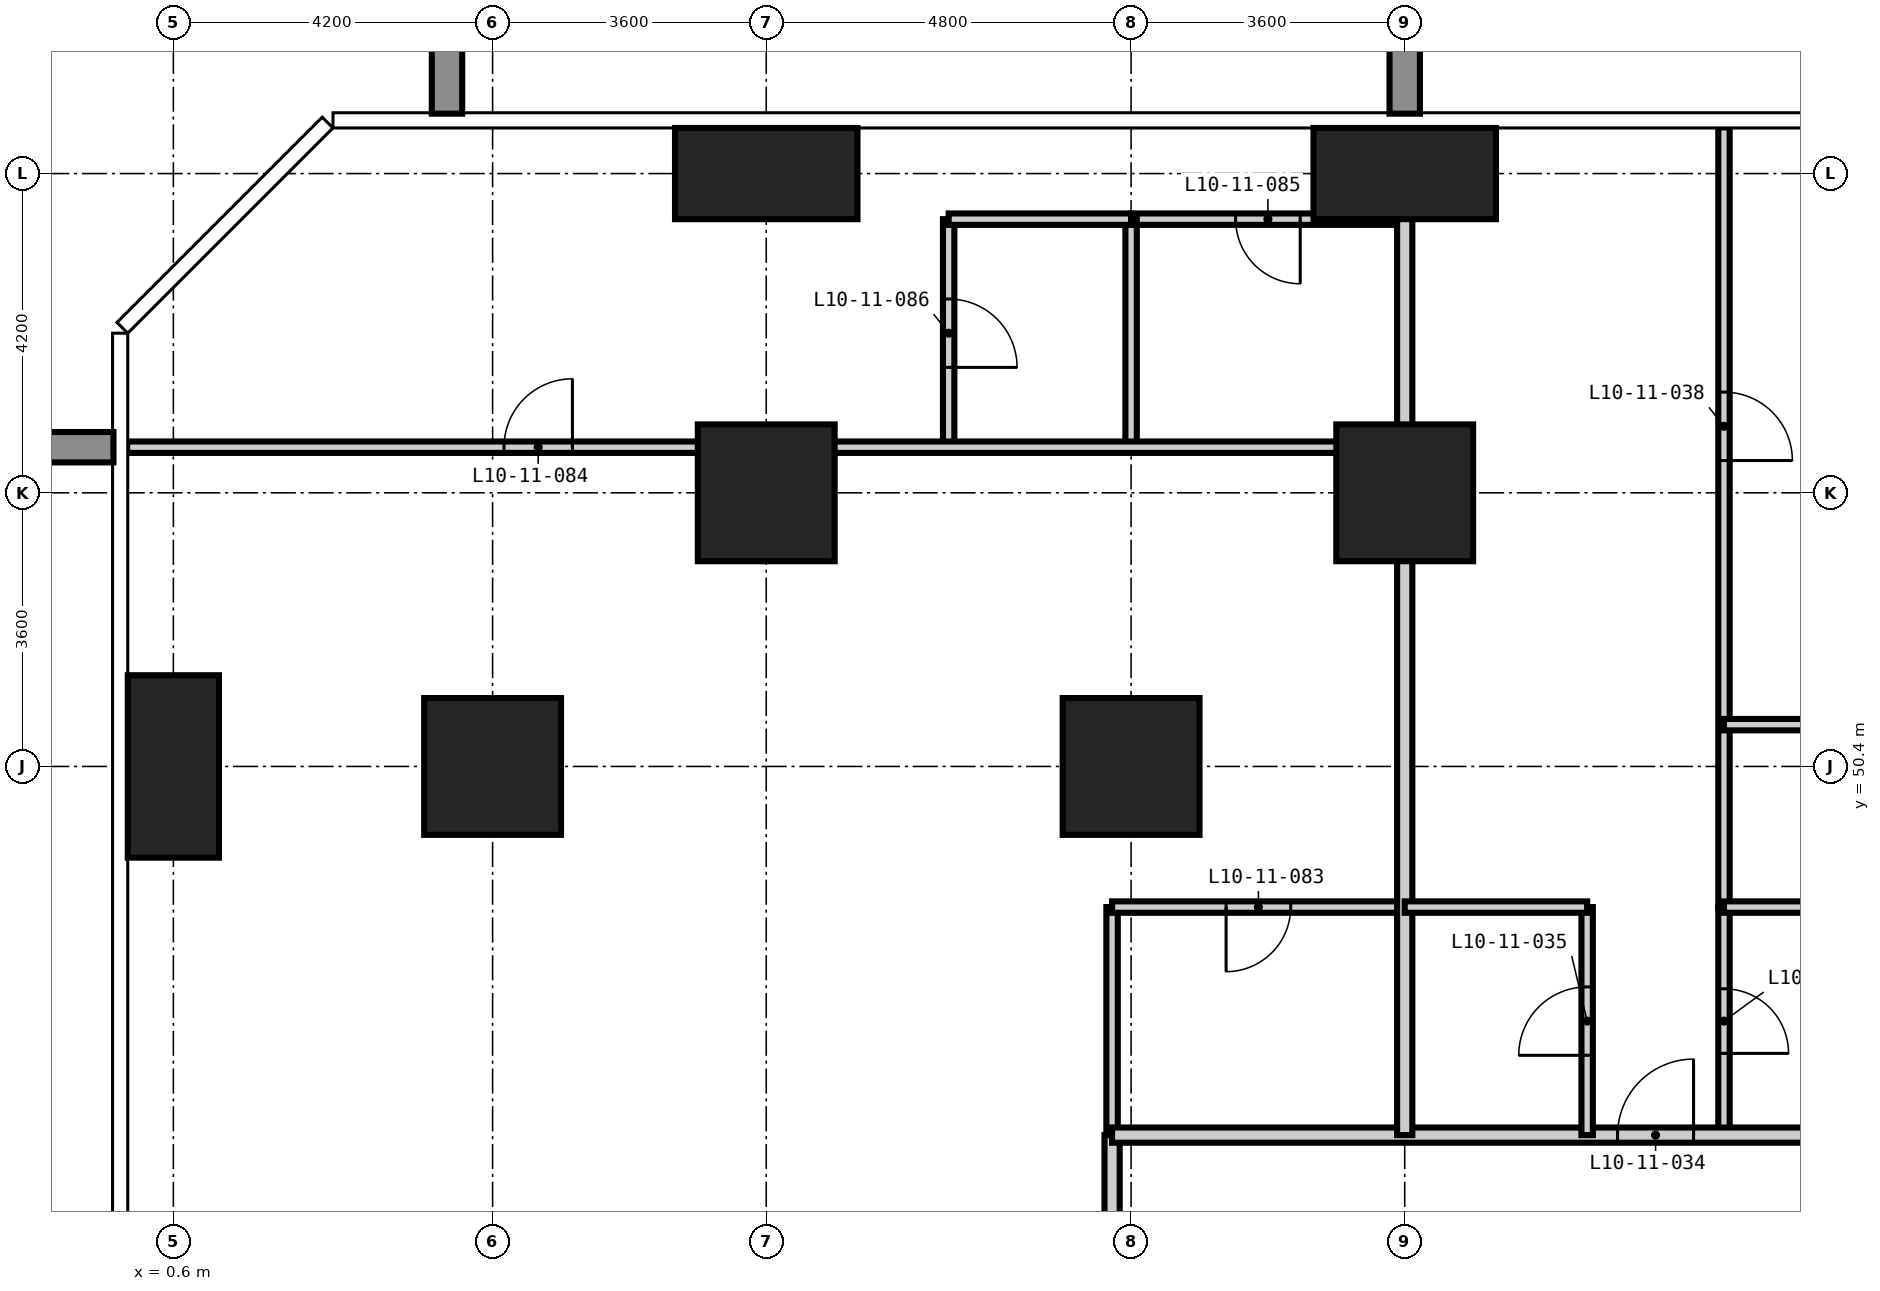
"""IFC4 building model, lengths in metres.
Left out: names, types, materials, properties, quantities, classifications, styles, units other than length and angle.
Written with IfcOpenShell. Run it as: python <this file> out.ifc"""

import sys

from ifc_helpers import new_model, si_unit, direction, frame, frame_2d, origin, origin_2d, place, context, subcontext, project, spatial, rectangle, extrude, element, fill, save


model = new_model("IFC4")
c1 = context("Model", 3, precision=1e-05, world=origin(), true_north=direction((0.0, 1.0)))
c2 = subcontext(c1, "Body", "Model", "MODEL_VIEW")
j1 = project(units=[si_unit("LENGTHUNIT", "METRE"), si_unit("PLANEANGLEUNIT", "RADIAN")], contexts=[c1])
p1 = place(None, origin())
s1 = spatial("IfcSite", under=j1, at=p1, CompositionType="ELEMENT")
p2 = place(p1, origin())
s2 = spatial("IfcBuilding", under=s1, at=p2, CompositionType="ELEMENT")
p3 = place(p2, frame((0.0, 0.0, 45.0)))
s3 = spatial("IfcBuildingStorey", under=s2, at=p3, CompositionType="ELEMENT", Elevation=45.0)
p4 = place(p3, frame((0.6, 50.4, -0.35), z_axis=(0.0, 0.0, 1.0), x_axis=(1.0, 0.0, 0.0)))
e1 = element("IfcColumn", 1, at=p4, inside=s3, PredefinedType="COLUMN", context=c2, shape_type="SweptSolid", body=[
    extrude(rectangle(XDim=1.2, YDim=2.4, at=origin_2d()), origin(), (0.0, 0.0, 1.0), 3.6),
])
for number, where, z_axis, x_axis in (
    (2, (4.8, 50.4, -0.35), (0.0, 0.0, 1.0), (1.0, 0.0, 0.0)),
    (3, (8.4, 54.0, -0.35), (0.0, 0.0, 1.0), (1.0, 0.0, 0.0)),
):
    element("IfcColumn", number, at=place(p3, frame(where, z_axis=z_axis, x_axis=x_axis)), inside=s3, PredefinedType="COLUMN", context=c2, shape_type="SweptSolid", body=[
        extrude(rectangle(XDim=1.8, YDim=1.8, at=origin_2d()), origin(), (0.0, 0.0, 1.0), 3.6),
    ])
p5 = place(p3, frame((8.4, 58.2, -0.35), z_axis=(0.0, 0.0, 1.0), x_axis=(1.0, 0.0, 0.0)))
e4 = element("IfcColumn", 4, at=p5, inside=s3, PredefinedType="COLUMN", context=c2, shape_type="SweptSolid", body=[
    extrude(rectangle(XDim=2.4, YDim=1.2, at=origin_2d()), origin(), (0.0, 0.0, 1.0), 3.6),
])
for number, where, z_axis, x_axis in (
    (5, (13.2, 50.4, -0.35), (0.0, 0.0, 1.0), (1.0, 0.0, 0.0)),
    (6, (16.8, 54.0, -0.35), (0.0, 0.0, 1.0), (1.0, 0.0, 0.0)),
):
    element("IfcColumn", number, at=place(p3, frame(where, z_axis=z_axis, x_axis=x_axis)), inside=s3, PredefinedType="COLUMN", context=c2, shape_type="SweptSolid", body=[
        extrude(rectangle(XDim=1.8, YDim=1.8, at=origin_2d()), origin(), (0.0, 0.0, 1.0), 3.6),
    ])
p6 = place(p3, frame((16.8, 58.2, -0.35), z_axis=(0.0, 0.0, 1.0), x_axis=(1.0, 0.0, 0.0)))
e7 = element("IfcColumn", 7, at=p6, inside=s3, PredefinedType="COLUMN", context=c2, shape_type="SweptSolid", body=[
    extrude(rectangle(XDim=2.4, YDim=1.2, at=origin_2d()), origin(), (0.0, 0.0, 1.0), 3.6),
])
p7 = place(p3, frame((12.95, 45.55, 0.0), z_axis=(0.0, 0.0, 1.0), x_axis=(0.0, 1.0, 0.0)))
e8 = element("IfcWall", 8, at=p7, inside=s3, PredefinedType="PARTITIONING", context=c2, shape_type="SweptSolid", body=[
    extrude(rectangle(XDim=3.0, YDim=0.15, at=frame_2d((1.5, 0.0))), origin(), (0.0, 0.0, 1.0), 3.25),
])
p8 = place(p3, frame((21.0, 45.55, 0.0), z_axis=(0.0, 0.0, 1.0), x_axis=(0.0, 1.0, 0.0)))
e9 = element("IfcWall", 9, at=p8, inside=s3, PredefinedType="PARTITIONING", context=c2, shape_type="SweptSolid", body=[
    extrude(rectangle(XDim=3.0, YDim=0.15, at=frame_2d((1.5, 0.0))), origin(), (0.0, 0.0, 1.0), 3.25),
])
p9 = place(p8, frame((1.075, 0.0, 0.0)))
e10 = element("IfcOpeningElement", 10, at=p9, cuts=e9, PredefinedType="OPENING", context=c2, shape_type="SweptSolid", body=[
    extrude(rectangle(XDim=0.85, YDim=2.1, at=frame_2d((0.425, 1.05))), frame((0.0, 0.085, 0.0), z_axis=(0.0, -1.0, 0.0), x_axis=(1.0, 0.0, 0.0)), (0.0, 0.0, 1.0), 0.17),
])
p10 = place(p3, frame((12.95, 48.55, 0.0), z_axis=(0.0, 0.0, 1.0), x_axis=(1.0, 0.0, 0.0)))
e11 = element("IfcWall", 11, at=p10, inside=s3, PredefinedType="PARTITIONING", context=c2, shape_type="SweptSolid", body=[
    extrude(rectangle(XDim=3.85, YDim=0.15, at=frame_2d((1.925, 0.0))), origin(), (0.0, 0.0, 1.0), 3.25),
])
p11 = place(p10, frame((1.5, 0.0, 0.0)))
e12 = element("IfcOpeningElement", 12, at=p11, cuts=e11, PredefinedType="OPENING", context=c2, shape_type="SweptSolid", body=[
    extrude(rectangle(XDim=0.85, YDim=2.1, at=frame_2d((0.425, 1.05))), frame((0.0, 0.085, 0.0), z_axis=(0.0, -1.0, 0.0), x_axis=(1.0, 0.0, 0.0)), (0.0, 0.0, 1.0), 0.17),
])
p12 = place(p3, frame((13.2, 57.6, 0.0), z_axis=(0.0, 0.0, 1.0), x_axis=(1.0, 0.0, 0.0)))
e13 = element("IfcWall", 13, at=p12, inside=s3, PredefinedType="PARTITIONING", context=c2, shape_type="SweptSolid", body=[
    extrude(rectangle(XDim=3.6, YDim=0.15, at=frame_2d((1.8, 0.0))), origin(), (0.0, 0.0, 1.0), 3.25),
])
p13 = place(p12, frame((1.375, 0.0, 0.0)))
e14 = element("IfcOpeningElement", 14, at=p13, cuts=e13, PredefinedType="OPENING", context=c2, shape_type="SweptSolid", body=[
    extrude(rectangle(XDim=0.85, YDim=2.1, at=frame_2d((0.425, 1.05))), frame((0.0, 0.085, 0.0), z_axis=(0.0, -1.0, 0.0), x_axis=(1.0, 0.0, 0.0)), (0.0, 0.0, 1.0), 0.17),
])
p14 = place(p3, frame((12.95, 12.95, 0.0), z_axis=(0.0, 0.0, 1.0), x_axis=(0.0, 1.0, 0.0)))
e15 = element("IfcWall", 15, at=p14, inside=s3, PredefinedType="PARTITIONING", context=c2, shape_type="SweptSolid", body=[
    extrude(rectangle(XDim=32.6, YDim=0.2, at=frame_2d((16.3, 0.0))), origin(), (0.0, 0.0, 1.0), 3.25),
])
p15 = place(p14, frame((8.45, 0.0, 0.0)))
e16 = element("IfcOpeningElement", 16, at=p15, cuts=e15, PredefinedType="OPENING", context=c2, shape_type="SweptSolid", body=[
    extrude(rectangle(XDim=1.0, YDim=2.2, at=frame_2d((0.5, 1.1))), frame((0.0, 0.11, 0.0), z_axis=(0.0, -1.0, 0.0), x_axis=(1.0, 0.0, 0.0)), (0.0, 0.0, 1.0), 0.22),
])
p16 = place(p14, frame((16.7, 0.0, 0.0)))
e17 = element("IfcOpeningElement", 17, at=p16, cuts=e15, PredefinedType="OPENING", context=c2, shape_type="SweptSolid", body=[
    extrude(rectangle(XDim=1.0, YDim=2.2, at=frame_2d((0.5, 1.1))), frame((0.0, 0.11, 0.0), z_axis=(0.0, -1.0, 0.0), x_axis=(1.0, 0.0, 0.0)), (0.0, 0.0, 1.0), 0.22),
])
p17 = place(p14, frame((23.6, 0.0, 0.0)))
e18 = element("IfcOpeningElement", 18, at=p17, cuts=e15, PredefinedType="OPENING", context=c2, shape_type="SweptSolid", body=[
    extrude(rectangle(XDim=1.0, YDim=2.2, at=frame_2d((0.5, 1.1))), frame((0.0, 0.11, 0.0), z_axis=(0.0, -1.0, 0.0), x_axis=(1.0, 0.0, 0.0)), (0.0, 0.0, 1.0), 0.22),
])
p18 = place(p14, frame((25.1, 0.0, 0.0)))
e19 = element("IfcOpeningElement", 19, at=p18, cuts=e15, PredefinedType="OPENING", context=c2, shape_type="SweptSolid", body=[
    extrude(rectangle(XDim=1.0, YDim=2.2, at=frame_2d((0.5, 1.1))), frame((0.0, 0.11, 0.0), z_axis=(0.0, -1.0, 0.0), x_axis=(1.0, 0.0, 0.0)), (0.0, 0.0, 1.0), 0.22),
])
p19 = place(p14, frame((1.425, 0.0, 0.0)))
e20 = element("IfcOpeningElement", 20, at=p19, cuts=e15, PredefinedType="OPENING", context=c2, shape_type="SweptSolid", body=[
    extrude(rectangle(XDim=1.0, YDim=2.2, at=frame_2d((0.5, 1.1))), frame((0.0, 0.11, 0.0), z_axis=(0.0, -1.0, 0.0), x_axis=(1.0, 0.0, 0.0)), (0.0, 0.0, 1.0), 0.22),
])
p20 = place(p14, frame((30.325, 0.0, 0.0)))
e21 = element("IfcOpeningElement", 21, at=p20, cuts=e15, PredefinedType="OPENING", context=c2, shape_type="SweptSolid", body=[
    extrude(rectangle(XDim=1.0, YDim=2.2, at=frame_2d((0.5, 1.1))), frame((0.0, 0.11, 0.0), z_axis=(0.0, -1.0, 0.0), x_axis=(1.0, 0.0, 0.0)), (0.0, 0.0, 1.0), 0.22),
])
p21 = place(p3, frame((12.95, 45.55, 0.0), z_axis=(0.0, 0.0, 1.0), x_axis=(1.0, 0.0, 0.0)))
e22 = element("IfcWall", 22, at=p21, inside=s3, PredefinedType="PARTITIONING", context=c2, shape_type="SweptSolid", body=[
    extrude(rectangle(XDim=32.3, YDim=0.2, at=frame_2d((16.15, 0.0))), origin(), (0.0, 0.0, 1.0), 3.25),
])
p22 = place(p21, frame((6.65, 0.0, 0.0)))
e23 = element("IfcOpeningElement", 23, at=p22, cuts=e22, PredefinedType="OPENING", context=c2, shape_type="SweptSolid", body=[
    extrude(rectangle(XDim=1.0, YDim=2.2, at=frame_2d((0.5, 1.1))), frame((0.0, 0.11, 0.0), z_axis=(0.0, -1.0, 0.0), x_axis=(1.0, 0.0, 0.0)), (0.0, 0.0, 1.0), 0.22),
])
p23 = place(p21, frame((15.05, 0.0, 0.0)))
e24 = element("IfcOpeningElement", 24, at=p23, cuts=e22, PredefinedType="OPENING", context=c2, shape_type="SweptSolid", body=[
    extrude(rectangle(XDim=1.0, YDim=2.2, at=frame_2d((0.5, 1.1))), frame((0.0, 0.11, 0.0), z_axis=(0.0, -1.0, 0.0), x_axis=(1.0, 0.0, 0.0)), (0.0, 0.0, 1.0), 0.22),
])
p24 = place(p21, frame((23.45, 0.0, 0.0)))
e25 = element("IfcOpeningElement", 25, at=p24, cuts=e22, PredefinedType="OPENING", context=c2, shape_type="SweptSolid", body=[
    extrude(rectangle(XDim=1.0, YDim=2.2, at=frame_2d((0.5, 1.1))), frame((0.0, 0.11, 0.0), z_axis=(0.0, -1.0, 0.0), x_axis=(1.0, 0.0, 0.0)), (0.0, 0.0, 1.0), 0.22),
])
p25 = place(p3, frame((16.8, 45.55, 0.0), z_axis=(0.0, 0.0, 1.0), x_axis=(0.0, 1.0, 0.0)))
e26 = element("IfcWall", 26, at=p25, inside=s3, PredefinedType="PARTITIONING", context=c2, shape_type="SweptSolid", body=[
    extrude(rectangle(XDim=13.258, YDim=0.2, at=frame_2d((6.629, 0.0))), origin(), (0.0, 0.0, 1.0), 3.25),
])
p26 = place(p3, frame((10.8, 54.6, 0.0), z_axis=(0.0, 0.0, 1.0), x_axis=(0.0, 1.0, 0.0)))
e27 = element("IfcWall", 27, at=p26, inside=s3, PredefinedType="PARTITIONING", context=c2, shape_type="SweptSolid", body=[
    extrude(rectangle(XDim=3.0, YDim=0.15, at=frame_2d((1.5, 0.0))), origin(), (0.0, 0.0, 1.0), 3.25),
])
p27 = place(p26, frame((1.05, 0.0, 0.0)))
e28 = element("IfcOpeningElement", 28, at=p27, cuts=e27, PredefinedType="OPENING", context=c2, shape_type="SweptSolid", body=[
    extrude(rectangle(XDim=0.9, YDim=2.1, at=frame_2d((0.45, 1.05))), frame((0.0, 0.085, 0.0), z_axis=(0.0, -1.0, 0.0), x_axis=(1.0, 0.0, 0.0)), (0.0, 0.0, 1.0), 0.17),
])
p28 = place(p3, frame((13.2, 54.6, 0.0), z_axis=(0.0, 0.0, 1.0), x_axis=(0.0, 1.0, 0.0)))
e29 = element("IfcWall", 29, at=p28, inside=s3, PredefinedType="PARTITIONING", context=c2, shape_type="SweptSolid", body=[
    extrude(rectangle(XDim=3.0, YDim=0.15, at=frame_2d((1.5, 0.0))), origin(), (0.0, 0.0, 1.0), 3.25),
])
p29 = place(p3, frame((19.2, 45.55, 0.0), z_axis=(0.0, 0.0, 1.0), x_axis=(0.0, 1.0, 0.0)))
e30 = element("IfcWall", 30, at=p29, inside=s3, PredefinedType="PARTITIONING", context=c2, shape_type="SweptSolid", body=[
    extrude(rectangle(XDim=3.0, YDim=0.15, at=frame_2d((1.5, 0.0))), origin(), (0.0, 0.0, 1.0), 3.25),
])
p30 = place(p29, frame((1.05, 0.0, 0.0)))
e31 = element("IfcOpeningElement", 31, at=p30, cuts=e30, PredefinedType="OPENING", context=c2, shape_type="SweptSolid", body=[
    extrude(rectangle(XDim=0.9, YDim=2.1, at=frame_2d((0.45, 1.05))), frame((0.0, 0.085, 0.0), z_axis=(0.0, -1.0, 0.0), x_axis=(1.0, 0.0, 0.0)), (0.0, 0.0, 1.0), 0.17),
])
p31 = place(p3, frame((21.0, 48.55, 0.0), z_axis=(0.0, 0.0, 1.0), x_axis=(0.0, 1.0, 0.0)))
e32 = element("IfcWall", 32, at=p31, inside=s3, PredefinedType="PARTITIONING", context=c2, shape_type="SweptSolid", body=[
    extrude(rectangle(XDim=10.258, YDim=0.15, at=frame_2d((5.129, 0.0))), origin(), (0.0, 0.0, 1.0), 3.25),
])
p32 = place(p31, frame((5.875, 0.0, 0.0)))
e33 = element("IfcOpeningElement", 33, at=p32, cuts=e32, PredefinedType="OPENING", context=c2, shape_type="SweptSolid", body=[
    extrude(rectangle(XDim=0.9, YDim=2.1, at=frame_2d((0.45, 1.05))), frame((0.0, 0.085, 0.0), z_axis=(0.0, -1.0, 0.0), x_axis=(1.0, 0.0, 0.0)), (0.0, 0.0, 1.0), 0.17),
])
p33 = place(p3, frame((16.8, 48.55, 0.0), z_axis=(0.0, 0.0, 1.0), x_axis=(1.0, 0.0, 0.0)))
e34 = element("IfcWall", 34, at=p33, inside=s3, PredefinedType="PARTITIONING", context=c2, shape_type="SweptSolid", body=[
    extrude(rectangle(XDim=2.4, YDim=0.15, at=frame_2d((1.2, 0.0))), origin(), (0.0, 0.0, 1.0), 3.25),
])
p34 = place(p3, frame((21.0, 48.55, 0.0), z_axis=(0.0, 0.0, 1.0), x_axis=(1.0, 0.0, 0.0)))
e35 = element("IfcWall", 35, at=p34, inside=s3, PredefinedType="PARTITIONING", context=c2, shape_type="SweptSolid", body=[
    extrude(rectangle(XDim=6.6, YDim=0.15, at=frame_2d((3.3, 0.0))), origin(), (0.0, 0.0, 1.0), 3.25),
])
p35 = place(p3, frame((21.0, 50.95, 0.0), z_axis=(0.0, 0.0, 1.0), x_axis=(1.0, 0.0, 0.0)))
e36 = element("IfcWall", 36, at=p35, inside=s3, PredefinedType="PARTITIONING", context=c2, shape_type="SweptSolid", body=[
    extrude(rectangle(XDim=4.2, YDim=0.15, at=frame_2d((2.1, 0.0))), origin(), (0.0, 0.0, 1.0), 3.25),
])
p36 = place(p35, frame((1.65, 0.0, 0.0)))
e37 = element("IfcOpeningElement", 37, at=p36, cuts=e36, PredefinedType="OPENING", context=c2, shape_type="SweptSolid", body=[
    extrude(rectangle(XDim=0.9, YDim=2.1, at=frame_2d((0.45, 1.05))), frame((0.0, 0.085, 0.0), z_axis=(0.0, -1.0, 0.0), x_axis=(1.0, 0.0, 0.0)), (0.0, 0.0, 1.0), 0.17),
])
p37 = place(p3, frame((-0.008, 54.6, 0.0), z_axis=(0.0, 0.0, 1.0), x_axis=(1.0, 0.0, 0.0)))
e38 = element("IfcWall", 38, at=p37, inside=s3, PredefinedType="PARTITIONING", context=c2, shape_type="SweptSolid", body=[
    extrude(rectangle(XDim=16.808, YDim=0.15, at=frame_2d((8.404, 0.0))), origin(), (0.0, 0.0, 1.0), 3.25),
])
p38 = place(p37, frame((4.958, 0.0, 0.0)))
e39 = element("IfcOpeningElement", 39, at=p38, cuts=e38, PredefinedType="OPENING", context=c2, shape_type="SweptSolid", body=[
    extrude(rectangle(XDim=0.9, YDim=2.1, at=frame_2d((0.45, 1.05))), frame((0.0, 0.085, 0.0), z_axis=(0.0, -1.0, 0.0), x_axis=(1.0, 0.0, 0.0)), (0.0, 0.0, 1.0), 0.17),
])
p39 = place(p3, frame((10.8, 57.6, 0.0), z_axis=(0.0, 0.0, 1.0), x_axis=(1.0, 0.0, 0.0)))
e40 = element("IfcWall", 40, at=p39, inside=s3, PredefinedType="PARTITIONING", context=c2, shape_type="SweptSolid", body=[
    extrude(rectangle(XDim=2.4, YDim=0.15, at=frame_2d((1.2, 0.0))), origin(), (0.0, 0.0, 1.0), 3.25),
])
p40 = place(p22, origin())
e41 = element("IfcDoor", 41, at=p40, inside=s3, OperationType="SINGLE_SWING_RIGHT", PredefinedType="DOOR", context=c2, shape_type="SweptSolid", body=[
    extrude(rectangle(XDim=1.0, YDim=2.2, at=frame_2d((0.5, 1.1))), frame((0.0, 0.025, 0.0), z_axis=(0.0, -1.0, 0.0), x_axis=(1.0, 0.0, 0.0)), (0.0, 0.0, 1.0), 0.05),
])
fill(e23, e41)
p41 = place(p30, origin())
e42 = element("IfcDoor", 42, at=p41, inside=s3, OperationType="SINGLE_SWING_LEFT", PredefinedType="DOOR", context=c2, shape_type="SweptSolid", body=[
    extrude(rectangle(XDim=0.9, YDim=2.1, at=frame_2d((0.45, 1.05))), frame((0.0, 0.025, 0.0), z_axis=(0.0, -1.0, 0.0), x_axis=(1.0, 0.0, 0.0)), (0.0, 0.0, 1.0), 0.05),
])
fill(e31, e42)
p42 = place(p9, frame((0.85, 0.0, 0.0), z_axis=(0.0, 0.0, 1.0), x_axis=(-1.0, 0.0, 0.0)))
e43 = element("IfcDoor", 43, at=p42, inside=s3, OperationType="SINGLE_SWING_RIGHT", PredefinedType="DOOR", context=c2, shape_type="SweptSolid", body=[
    extrude(rectangle(XDim=0.85, YDim=2.1, at=frame_2d((0.425, 1.05))), frame((0.0, 0.025, 0.0), z_axis=(0.0, -1.0, 0.0), x_axis=(1.0, 0.0, 0.0)), (0.0, 0.0, 1.0), 0.05),
])
fill(e10, e43)
p43 = place(p32, frame((0.9, 0.0, 0.0), z_axis=(0.0, 0.0, 1.0), x_axis=(-1.0, 0.0, 0.0)))
e44 = element("IfcDoor", 44, at=p43, inside=s3, OperationType="SINGLE_SWING_RIGHT", PredefinedType="DOOR", context=c2, shape_type="SweptSolid", body=[
    extrude(rectangle(XDim=0.9, YDim=2.1, at=frame_2d((0.45, 1.05))), frame((0.0, 0.025, 0.0), z_axis=(0.0, -1.0, 0.0), x_axis=(1.0, 0.0, 0.0)), (0.0, 0.0, 1.0), 0.05),
])
fill(e33, e44)
p44 = place(p11, frame((0.85, 0.0, 0.0), z_axis=(0.0, 0.0, 1.0), x_axis=(-1.0, 0.0, 0.0)))
e45 = element("IfcDoor", 45, at=p44, inside=s3, OperationType="SINGLE_SWING_RIGHT", PredefinedType="DOOR", context=c2, shape_type="SweptSolid", body=[
    extrude(rectangle(XDim=0.85, YDim=2.1, at=frame_2d((0.425, 1.05))), frame((0.0, 0.025, 0.0), z_axis=(0.0, -1.0, 0.0), x_axis=(1.0, 0.0, 0.0)), (0.0, 0.0, 1.0), 0.05),
])
fill(e12, e45)
p45 = place(p38, origin())
e46 = element("IfcDoor", 46, at=p45, inside=s3, OperationType="SINGLE_SWING_RIGHT", PredefinedType="DOOR", context=c2, shape_type="SweptSolid", body=[
    extrude(rectangle(XDim=0.9, YDim=2.1, at=frame_2d((0.45, 1.05))), frame((0.0, 0.025, 0.0), z_axis=(0.0, -1.0, 0.0), x_axis=(1.0, 0.0, 0.0)), (0.0, 0.0, 1.0), 0.05),
])
fill(e39, e46)
p46 = place(p13, frame((0.85, 0.0, 0.0), z_axis=(0.0, 0.0, 1.0), x_axis=(-1.0, 0.0, 0.0)))
e47 = element("IfcDoor", 47, at=p46, inside=s3, OperationType="SINGLE_SWING_LEFT", PredefinedType="DOOR", context=c2, shape_type="SweptSolid", body=[
    extrude(rectangle(XDim=0.85, YDim=2.1, at=frame_2d((0.425, 1.05))), frame((0.0, 0.025, 0.0), z_axis=(0.0, -1.0, 0.0), x_axis=(1.0, 0.0, 0.0)), (0.0, 0.0, 1.0), 0.05),
])
fill(e14, e47)
p47 = place(p27, frame((0.9, 0.0, 0.0), z_axis=(0.0, 0.0, 1.0), x_axis=(-1.0, 0.0, 0.0)))
e48 = element("IfcDoor", 48, at=p47, inside=s3, OperationType="SINGLE_SWING_RIGHT", PredefinedType="DOOR", context=c2, shape_type="SweptSolid", body=[
    extrude(rectangle(XDim=0.9, YDim=2.1, at=frame_2d((0.45, 1.05))), frame((0.0, 0.025, 0.0), z_axis=(0.0, -1.0, 0.0), x_axis=(1.0, 0.0, 0.0)), (0.0, 0.0, 1.0), 0.05),
])
fill(e28, e48)
save(model, sys.argv[1])
